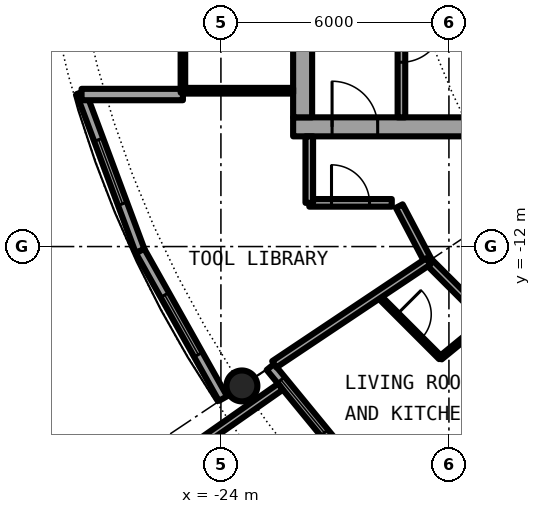
"""IFC4 building model, lengths in metres.
Left out: names, types, materials, properties, quantities, classifications, styles, units other than length and angle.
Written with IfcOpenShell. Run it as: python <this file> out.ifc"""

import sys

from ifc_helpers import new_model, si_unit, direction, frame, frame_2d, origin, origin_2d, place, context, subcontext, project, spatial, rectangle, hollow_circle, extrude, element, fill, save


model = new_model("IFC4")
c1 = context("Model", 3, precision=1e-05, world=origin(), true_north=direction((0.0, 1.0)))
c2 = subcontext(c1, "Body", "Model", "MODEL_VIEW")
j1 = project(units=[si_unit("LENGTHUNIT", "METRE"), si_unit("PLANEANGLEUNIT", "RADIAN")], contexts=[c1])
p1 = place(None, origin())
s1 = spatial("IfcSite", under=j1, at=p1, CompositionType="ELEMENT")
p2 = place(p1, origin())
s2 = spatial("IfcBuilding", under=s1, at=p2, CompositionType="ELEMENT")
p3 = place(p2, frame((0.0, 0.0, 167.7)))
s3 = spatial("IfcBuildingStorey", under=s2, at=p3, CompositionType="ELEMENT", Elevation=167.7)
p4 = place(p3, frame((-23.448, -15.667, 0.0), z_axis=(0.0, 0.0, 1.0), x_axis=(1.0, 0.0, 0.0)))
e1 = element("IfcColumn", 1, at=p4, inside=s3, PredefinedType="COLUMN", context=c2, shape_type="SweptSolid", body=[
    extrude(hollow_circle(Radius=0.406, WallThickness=0.04, at=origin_2d()), origin(), (0.0, 0.0, 1.0), 3.05),
])
p5 = place(p3, frame((-22.699, -15.167, 0.0), z_axis=(0.0, 0.0, 1.0), x_axis=(0.634382322723, -0.773019449054, 0.0)))
e2 = element("IfcWall", 2, at=p5, inside=s3, PredefinedType="SOLIDWALL", context=c2, shape_type="SweptSolid", body=[
    extrude(rectangle(XDim=5.352, YDim=0.25, at=frame_2d((2.676, 0.0))), origin(), (0.0, 0.0, 1.0), 2.7),
])
p6 = place(p5, frame((0.441, 0.0, 0.3)))
e3 = element("IfcOpeningElement", 3, at=p6, cuts=e2, PredefinedType="OPENING", context=c2, shape_type="SweptSolid", body=[
    extrude(rectangle(XDim=1.8, YDim=2.1, at=frame_2d((0.9, 1.05))), frame((0.0, 0.135, 0.0), z_axis=(0.0, -1.0, 0.0), x_axis=(1.0, 0.0, 0.0)), (0.0, 0.0, 1.0), 0.27),
])
p7 = place(p5, frame((3.51, 0.0, 0.0)))
e4 = element("IfcOpeningElement", 4, at=p7, cuts=e2, PredefinedType="OPENING", context=c2, shape_type="SweptSolid", body=[
    extrude(rectangle(XDim=1.0, YDim=2.2, at=frame_2d((0.5, 1.1))), frame((0.0, 0.135, 0.0), z_axis=(0.0, -1.0, 0.0), x_axis=(1.0, 0.0, 0.0)), (0.0, 0.0, 1.0), 0.27),
])
p8 = place(p3, frame((-22.433, -15.688, -0.03), z_axis=(0.0, 0.0, 1.0), x_axis=(-0.819373043115, -0.573260687834, 0.0)))
e5 = element("IfcWall", 5, at=p8, inside=s3, PredefinedType="SOLIDWALL", context=c2, shape_type="SweptSolid", body=[
    extrude(rectangle(XDim=2.925, YDim=0.2, at=frame_2d((1.463, 0.0))), origin(), (0.0, 0.0, 1.0), 2.73),
])
p9 = place(p3, frame((-27.682, -7.945, 0.0), z_axis=(0.0, 0.0, 1.0), x_axis=(0.349247811493, -0.937030397675, 0.0)))
e6 = element("IfcWall", 6, at=p9, inside=s3, PredefinedType="SOLIDWALL", context=c2, shape_type="SweptSolid", body=[
    extrude(rectangle(XDim=4.452, YDim=0.25, at=frame_2d((2.226, 0.0))), origin(), (0.0, 0.0, 1.0), 2.7),
])
p10 = place(p9, frame((1.327, 0.0, 0.3)))
e7 = element("IfcOpeningElement", 7, at=p10, cuts=e6, PredefinedType="OPENING", context=c2, shape_type="SweptSolid", body=[
    extrude(rectangle(XDim=1.8, YDim=2.1, at=frame_2d((0.9, 1.05))), frame((0.0, 0.135, 0.0), z_axis=(0.0, -1.0, 0.0), x_axis=(1.0, 0.0, 0.0)), (0.0, 0.0, 1.0), 0.27),
])
p11 = place(p3, frame((-26.127, -12.117, 0.0), z_axis=(0.0, 0.0, 1.0), x_axis=(0.489696356642, -0.871893042919, 0.0)))
e8 = element("IfcWall", 8, at=p11, inside=s3, PredefinedType="SOLIDWALL", context=c2, shape_type="SweptSolid", body=[
    extrude(rectangle(XDim=4.454, YDim=0.25, at=frame_2d((2.227, 0.0))), origin(), (0.0, 0.0, 1.0), 2.7),
])
p12 = place(p11, frame((1.327, 0.0, 0.3)))
e9 = element("IfcOpeningElement", 9, at=p12, cuts=e8, PredefinedType="OPENING", context=c2, shape_type="SweptSolid", body=[
    extrude(rectangle(XDim=1.8, YDim=2.1, at=frame_2d((0.9, 1.05))), frame((0.0, 0.135, 0.0), z_axis=(0.0, -1.0, 0.0), x_axis=(1.0, 0.0, 0.0)), (0.0, 0.0, 1.0), 0.27),
])
p13 = place(p3, frame((-25.0, -8.0, 0.0), z_axis=(0.0, 0.0, 1.0), x_axis=(-1.0, 0.0, 0.0)))
e10 = element("IfcWall", 10, at=p13, inside=s3, PredefinedType="SOLIDWALL", context=c2, shape_type="SweptSolid", body=[
    extrude(rectangle(XDim=2.667, YDim=0.3, at=frame_2d((1.333, 0.0))), origin(), (0.0, 0.0, 1.0), 2.7),
])
p14 = place(p3, frame((-22.1, -8.85, 0.0), z_axis=(0.0, 0.0, 1.0), x_axis=(1.0, 0.0, 0.0)))
e11 = element("IfcWall", 11, at=p14, inside=s3, PredefinedType="SHEAR", context=c2, shape_type="SweptSolid", body=[
    extrude(rectangle(XDim=13.6, YDim=0.5, at=frame_2d((6.8, 0.0))), origin(), (0.0, 0.0, 1.0), 3.05),
])
p15 = place(p14, frame((1.025, 0.0, 0.0)))
e12 = element("IfcOpeningElement", 12, at=p15, cuts=e11, PredefinedType="OPENING", context=c2, shape_type="SweptSolid", body=[
    extrude(rectangle(XDim=1.2, YDim=2.3, at=frame_2d((0.6, 1.15))), frame((0.0, 0.26, 0.0), z_axis=(0.0, -1.0, 0.0), x_axis=(1.0, 0.0, 0.0)), (0.0, 0.0, 1.0), 0.52),
])
p16 = place(p3, frame((-21.85, -8.6, 0.0), z_axis=(0.0, 0.0, 1.0), x_axis=(0.0, 1.0, 0.0)))
e13 = element("IfcWall", 13, at=p16, inside=s3, PredefinedType="SHEAR", context=c2, shape_type="SweptSolid", body=[
    extrude(rectangle(XDim=17.2, YDim=0.5, at=frame_2d((8.6, 0.0))), origin(), (0.0, 0.0, 1.0), 3.05),
])
p17 = place(p16, frame((7.7, 0.0, 0.0)))
e14 = element("IfcOpeningElement", 14, at=p17, cuts=e13, PredefinedType="OPENING", context=c2, shape_type="SweptSolid", body=[
    extrude(rectangle(XDim=1.8, YDim=2.3, at=frame_2d((0.9, 1.15))), frame((0.0, 0.26, 0.0), z_axis=(0.0, -1.0, 0.0), x_axis=(1.0, 0.0, 0.0)), (0.0, 0.0, 1.0), 0.52),
])
p18 = place(p3, frame((-19.25, -1.575, 0.0), z_axis=(0.0, 0.0, 1.0), x_axis=(0.0, -1.0, 0.0)))
e15 = element("IfcWall", 15, at=p18, inside=s3, PredefinedType="SOLIDWALL", context=c2, shape_type="SweptSolid", body=[
    extrude(rectangle(XDim=7.025, YDim=0.2, at=frame_2d((3.513, 0.0))), origin(), (0.0, 0.0, 1.0), 2.7),
])
p19 = place(p18, frame((4.475, 0.0, 0.0)))
e16 = element("IfcOpeningElement", 16, at=p19, cuts=e15, PredefinedType="OPENING", context=c2, shape_type="SweptSolid", body=[
    extrude(rectangle(XDim=1.1, YDim=2.3, at=frame_2d((0.55, 1.15))), frame((0.0, 0.11, 0.0), z_axis=(0.0, -1.0, 0.0), x_axis=(1.0, 0.0, 0.0)), (0.0, 0.0, 1.0), 0.22),
])
p20 = place(p3, frame((-22.1, -7.9, 0.0), z_axis=(0.0, 0.0, 1.0), x_axis=(-1.0, 0.0, 0.0)))
e17 = element("IfcWall", 17, at=p20, inside=s3, PredefinedType="PARTITIONING", context=c2, shape_type="SweptSolid", body=[
    extrude(rectangle(XDim=2.84, YDim=0.15, at=frame_2d((1.42, 0.0))), origin(), (0.0, 0.0, 1.0), 2.7),
])
p21 = place(p3, frame((-25.0, 7.95, 0.0), z_axis=(0.0, 0.0, 1.0), x_axis=(0.0, -1.0, 0.0)))
e18 = element("IfcWall", 18, at=p21, inside=s3, PredefinedType="PARTITIONING", context=c2, shape_type="SweptSolid", body=[
    extrude(rectangle(XDim=15.9, YDim=0.12, at=frame_2d((7.95, 0.0))), origin(), (0.0, 0.0, 1.0), 2.7),
])
p22 = place(p21, frame((0.95, 0.0, 0.1)))
e19 = element("IfcOpeningElement", 19, at=p22, cuts=e18, PredefinedType="OPENING", context=c2, shape_type="SweptSolid", body=[
    extrude(rectangle(XDim=14.0, YDim=2.35, at=frame_2d((7.0, 1.175))), frame((0.0, 0.07, 0.0), z_axis=(0.0, -1.0, 0.0), x_axis=(1.0, 0.0, 0.0)), (0.0, 0.0, 1.0), 0.14),
])
p23 = place(p3, frame((-19.872, -13.278, 0.0), z_axis=(0.0, 0.0, 1.0), x_axis=(0.706897299114, -0.707316201218, 0.0)))
e20 = element("IfcWall", 20, at=p23, inside=s3, PredefinedType="PARTITIONING", context=c2, shape_type="SweptSolid", body=[
    extrude(rectangle(XDim=2.331, YDim=0.1, at=frame_2d((1.166, 0.0))), origin(), (0.0, 0.0, 1.0), 2.7),
])
p24 = place(p23, frame((0.716, 0.0, 0.0)))
e21 = element("IfcOpeningElement", 21, at=p24, cuts=e20, PredefinedType="OPENING", context=c2, shape_type="SweptSolid", body=[
    extrude(rectangle(XDim=0.9, YDim=2.3, at=frame_2d((0.45, 1.15))), frame((0.0, 0.06, 0.0), z_axis=(0.0, -1.0, 0.0), x_axis=(1.0, 0.0, 0.0)), (0.0, 0.0, 1.0), 0.12),
])
p25 = place(p3, frame((-19.307, -10.935, 0.0), z_axis=(0.0, 0.0, 1.0), x_axis=(0.465605550524, -0.884992356646, 0.0)))
e22 = element("IfcWall", 22, at=p25, inside=s3, PredefinedType="PARTITIONING", context=c2, shape_type="SweptSolid", body=[
    extrude(rectangle(XDim=1.643, YDim=0.2, at=frame_2d((0.821, 0.0))), origin(), (0.0, 0.0, 1.0), 2.7),
])
p26 = place(p3, frame((-18.542, -12.389, 0.0), z_axis=(0.0, 0.0, 1.0), x_axis=(0.707106781187, -0.707106781187, 0.0)))
e23 = element("IfcWall", 23, at=p26, inside=s3, PredefinedType="PARTITIONING", context=c2, shape_type="SweptSolid", body=[
    extrude(rectangle(XDim=8.702, YDim=0.2, at=frame_2d((4.351, 0.0))), origin(), (0.0, 0.0, 1.0), 2.7),
])
p27 = place(p26, frame((4.938, 0.0, 0.0)))
e24 = element("IfcOpeningElement", 24, at=p27, cuts=e23, PredefinedType="OPENING", context=c2, shape_type="SweptSolid", body=[
    extrude(rectangle(XDim=1.0, YDim=2.3, at=frame_2d((0.5, 1.15))), frame((0.0, 0.11, 0.0), z_axis=(0.0, -1.0, 0.0), x_axis=(1.0, 0.0, 0.0)), (0.0, 0.0, 1.0), 0.22),
])
p28 = place(p3, frame((-21.675, -10.85, 0.0), z_axis=(0.0, 0.0, 1.0), x_axis=(1.0, 0.0, 0.0)))
e25 = element("IfcWall", 25, at=p28, inside=s3, PredefinedType="PARTITIONING", context=c2, shape_type="SweptSolid", body=[
    extrude(rectangle(XDim=2.171, YDim=0.2, at=frame_2d((1.085, 0.0))), origin(), (0.0, 0.0, 1.0), 2.7),
])
p29 = place(p28, frame((0.585, 0.0, 0.0)))
e26 = element("IfcOpeningElement", 26, at=p29, cuts=e25, PredefinedType="OPENING", context=c2, shape_type="SweptSolid", body=[
    extrude(rectangle(XDim=1.0, YDim=2.3, at=frame_2d((0.5, 1.15))), frame((0.0, 0.11, 0.0), z_axis=(0.0, -1.0, 0.0), x_axis=(1.0, 0.0, 0.0)), (0.0, 0.0, 1.0), 0.22),
])
p30 = place(p3, frame((-22.595, -15.098, 0.0), z_axis=(0.0, 0.0, 1.0), x_axis=(0.831387096605, 0.55569370664, 0.0)))
e27 = element("IfcWall", 27, at=p30, inside=s3, PredefinedType="PARTITIONING", context=c2, shape_type="SweptSolid", body=[
    extrude(rectangle(XDim=4.875, YDim=0.2, at=frame_2d((2.438, 0.0))), origin(), (0.0, 0.0, 1.0), 2.7),
])
p31 = place(p3, frame((-19.216, -19.216, 0.0), z_axis=(0.0, 0.0, 1.0), x_axis=(0.707106781187, 0.707106781187, 0.0)))
e28 = element("IfcWall", 28, at=p31, inside=s3, PredefinedType="PARTITIONING", context=c2, shape_type="SweptSolid", body=[
    extrude(rectangle(XDim=3.735, YDim=0.1, at=frame_2d((1.868, 0.0))), origin(), (0.0, 0.0, 1.0), 2.7),
])
p32 = place(p31, frame((1.417, 0.0, 0.0)))
e29 = element("IfcOpeningElement", 29, at=p32, cuts=e28, PredefinedType="OPENING", context=c2, shape_type="SweptSolid", body=[
    extrude(rectangle(XDim=0.9, YDim=2.3, at=frame_2d((0.45, 1.15))), frame((0.0, 0.06, 0.0), z_axis=(0.0, -1.0, 0.0), x_axis=(1.0, 0.0, 0.0)), (0.0, 0.0, 1.0), 0.12),
])
p33 = place(p3, frame((-18.222, -14.93, 0.0), z_axis=(0.0, 0.0, 1.0), x_axis=(0.773633255921, 0.633633636523, 0.0)))
e30 = element("IfcWall", 30, at=p33, inside=s3, PredefinedType="PARTITIONING", context=c2, shape_type="SweptSolid", body=[
    extrude(rectangle(XDim=1.578, YDim=0.1, at=frame_2d((0.789, 0.0))), origin(), (0.0, 0.0, 1.0), 2.7),
])
p34 = place(p3, frame((-21.675, -10.85, 0.0), z_axis=(0.0, 0.0, 1.0), x_axis=(0.0, 1.0, 0.0)))
e31 = element("IfcWall", 31, at=p34, inside=s3, PredefinedType="PARTITIONING", context=c2, shape_type="SweptSolid", body=[
    extrude(rectangle(XDim=1.75, YDim=0.2, at=frame_2d((0.875, 0.0))), origin(), (0.0, 0.0, 1.0), 2.7),
])
p35 = place(p6, origin())
e32 = element("IfcWindow", 32, at=p35, inside=s3, PartitioningType="SINGLE_PANEL", PredefinedType="WINDOW", context=c2, shape_type="SweptSolid", body=[
    extrude(rectangle(XDim=1.8, YDim=2.1, at=frame_2d((0.9, 1.05))), frame((0.0, 0.03, 0.0), z_axis=(0.0, -1.0, 0.0), x_axis=(1.0, 0.0, 0.0)), (0.0, 0.0, 1.0), 0.06),
])
fill(e3, e32)
p36 = place(p10, origin())
e33 = element("IfcWindow", 33, at=p36, inside=s3, PartitioningType="SINGLE_PANEL", PredefinedType="WINDOW", context=c2, shape_type="SweptSolid", body=[
    extrude(rectangle(XDim=1.8, YDim=2.1, at=frame_2d((0.9, 1.05))), frame((0.0, 0.03, 0.0), z_axis=(0.0, -1.0, 0.0), x_axis=(1.0, 0.0, 0.0)), (0.0, 0.0, 1.0), 0.06),
])
fill(e7, e33)
p37 = place(p12, origin())
e34 = element("IfcWindow", 34, at=p37, inside=s3, PartitioningType="SINGLE_PANEL", PredefinedType="WINDOW", context=c2, shape_type="SweptSolid", body=[
    extrude(rectangle(XDim=1.8, YDim=2.1, at=frame_2d((0.9, 1.05))), frame((0.0, 0.03, 0.0), z_axis=(0.0, -1.0, 0.0), x_axis=(1.0, 0.0, 0.0)), (0.0, 0.0, 1.0), 0.06),
])
fill(e9, e34)
p38 = place(p19, origin())
e35 = element("IfcDoor", 35, at=p38, inside=s3, OperationType="SINGLE_SWING_LEFT", PredefinedType="DOOR", context=c2, shape_type="SweptSolid", body=[
    extrude(rectangle(XDim=1.1, YDim=2.3, at=frame_2d((0.55, 1.15))), frame((0.0, 0.025, 0.0), z_axis=(0.0, -1.0, 0.0), x_axis=(1.0, 0.0, 0.0)), (0.0, 0.0, 1.0), 0.05),
])
fill(e16, e35)
p39 = place(p15, origin())
e36 = element("IfcDoor", 36, at=p39, inside=s3, OperationType="SINGLE_SWING_RIGHT", PredefinedType="DOOR", context=c2, shape_type="SweptSolid", body=[
    extrude(rectangle(XDim=1.2, YDim=2.3, at=frame_2d((0.6, 1.15))), frame((0.0, 0.025, 0.0), z_axis=(0.0, -1.0, 0.0), x_axis=(1.0, 0.0, 0.0)), (0.0, 0.0, 1.0), 0.05),
])
fill(e12, e36)
p40 = place(p22, origin())
e37 = element("IfcWindow", 37, at=p40, inside=s3, PartitioningType="SINGLE_PANEL", PredefinedType="WINDOW", context=c2, shape_type="SweptSolid", body=[
    extrude(rectangle(XDim=14.0, YDim=2.35, at=frame_2d((7.0, 1.175))), frame((0.0, 0.03, 0.0), z_axis=(0.0, -1.0, 0.0), x_axis=(1.0, 0.0, 0.0)), (0.0, 0.0, 1.0), 0.06),
])
fill(e19, e37)
p41 = place(p24, origin())
e38 = element("IfcDoor", 38, at=p41, inside=s3, OperationType="SINGLE_SWING_RIGHT", PredefinedType="DOOR", context=c2, shape_type="SweptSolid", body=[
    extrude(rectangle(XDim=0.9, YDim=2.3, at=frame_2d((0.45, 1.15))), frame((0.0, 0.025, 0.0), z_axis=(0.0, -1.0, 0.0), x_axis=(1.0, 0.0, 0.0)), (0.0, 0.0, 1.0), 0.05),
])
fill(e21, e38)
p42 = place(p29, origin())
e39 = element("IfcDoor", 39, at=p42, inside=s3, OperationType="SINGLE_SWING_LEFT", PredefinedType="DOOR", context=c2, shape_type="SweptSolid", body=[
    extrude(rectangle(XDim=1.0, YDim=2.3, at=frame_2d((0.5, 1.15))), frame((0.0, 0.025, 0.0), z_axis=(0.0, -1.0, 0.0), x_axis=(1.0, 0.0, 0.0)), (0.0, 0.0, 1.0), 0.05),
])
fill(e26, e39)
save(model, sys.argv[1])
